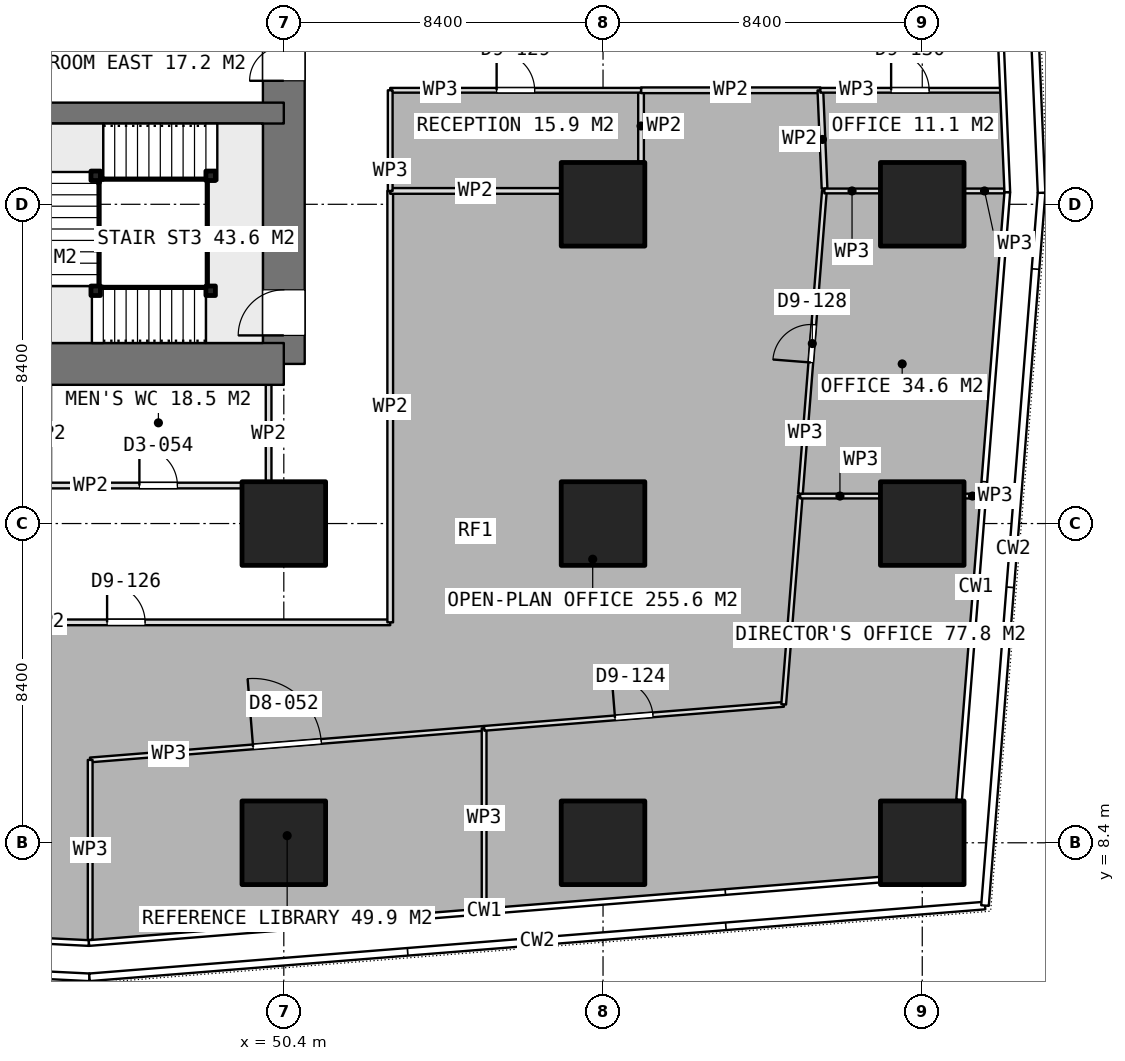
"""IFC4 building model, lengths in metres.
Left out: names, types, materials, properties, quantities, classifications, styles, units other than length and angle.
Written with IfcOpenShell. Run it as: python <this file> out.ifc"""

import sys

from ifc_helpers import new_model, si_unit, direction, frame, frame_2d, origin, origin_2d, place, context, subcontext, project, spatial, rectangle, extrude, element, fill, save


model = new_model("IFC4")
c1 = context("Model", 3, precision=1e-05, world=origin(), true_north=direction((0.0, 1.0)))
c2 = subcontext(c1, "Body", "Model", "MODEL_VIEW")
j1 = project(units=[si_unit("LENGTHUNIT", "METRE"), si_unit("PLANEANGLEUNIT", "RADIAN")], contexts=[c1])
p1 = place(None, origin())
s1 = spatial("IfcSite", under=j1, at=p1, CompositionType="ELEMENT")
p2 = place(p1, origin())
s2 = spatial("IfcBuilding", under=s1, at=p2, CompositionType="ELEMENT")
p3 = place(p2, frame((0.0, 0.0, 47.9)))
s3 = spatial("IfcBuildingStorey", under=s2, at=p3, CompositionType="ELEMENT", Elevation=47.9)
p4 = place(p3, frame((40.0, 21.0, 0.0), z_axis=(0.0, 0.0, 1.0), x_axis=(1.0, 0.0, 0.0)))
e1 = element("IfcWall", 1, at=p4, inside=s3, PredefinedType="SHEAR", context=c2, shape_type="SweptSolid", body=[
    extrude(rectangle(XDim=10.4, YDim=1.1, at=frame_2d((5.2, 0.0))), origin(), (0.0, 0.0, 1.0), 3.75),
])
p5 = place(p3, frame((50.4, 21.0, 0.0), z_axis=(0.0, 0.0, 1.0), x_axis=(0.0, 1.0, 0.0)))
e2 = element("IfcWall", 2, at=p5, inside=s3, PredefinedType="SHEAR", context=c2, shape_type="SweptSolid", body=[
    extrude(rectangle(XDim=25.2, YDim=1.1, at=frame_2d((12.6, 0.0))), origin(), (0.0, 0.0, 1.0), 3.75),
])
p6 = place(p5, frame((16.2, 0.0, 0.0)))
e3 = element("IfcOpeningElement", 3, at=p6, cuts=e2, PredefinedType="OPENING", context=c2, shape_type="SweptSolid", body=[
    extrude(rectangle(XDim=1.2, YDim=2.1, at=frame_2d((0.6, 1.05))), frame((0.0, 0.56, 0.0), z_axis=(0.0, -1.0, 0.0), x_axis=(1.0, 0.0, 0.0)), (0.0, 0.0, 1.0), 1.12),
])
p7 = place(p5, frame((10.05, 0.0, 0.0)))
e4 = element("IfcOpeningElement", 4, at=p7, cuts=e2, PredefinedType="OPENING", context=c2, shape_type="SweptSolid", body=[
    extrude(rectangle(XDim=0.9, YDim=2.1, at=frame_2d((0.45, 1.05))), frame((0.0, 0.56, 0.0), z_axis=(0.0, -1.0, 0.0), x_axis=(1.0, 0.0, 0.0)), (0.0, 0.0, 1.0), 1.12),
])
p8 = place(p5, frame((7.45, 0.0, 0.0)))
e5 = element("IfcOpeningElement", 5, at=p8, cuts=e2, PredefinedType="OPENING", context=c2, shape_type="SweptSolid", body=[
    extrude(rectangle(XDim=0.9, YDim=2.1, at=frame_2d((0.45, 1.05))), frame((0.0, 0.56, 0.0), z_axis=(0.0, -1.0, 0.0), x_axis=(1.0, 0.0, 0.0)), (0.0, 0.0, 1.0), 1.12),
])
p9 = place(p5, frame((0.75, 0.0, 0.0)))
e6 = element("IfcOpeningElement", 6, at=p9, cuts=e2, PredefinedType="OPENING", context=c2, shape_type="SweptSolid", body=[
    extrude(rectangle(XDim=1.2, YDim=2.1, at=frame_2d((0.6, 1.05))), frame((0.0, 0.56, 0.0), z_axis=(0.0, -1.0, 0.0), x_axis=(1.0, 0.0, 0.0)), (0.0, 0.0, 1.0), 1.12),
])
p10 = place(p3, frame((43.8, 27.6, 0.0), z_axis=(0.0, 0.0, 1.0), x_axis=(1.0, 0.0, 0.0)))
e7 = element("IfcWall", 7, at=p10, inside=s3, PredefinedType="SHEAR", context=c2, shape_type="SweptSolid", body=[
    extrude(rectangle(XDim=6.6, YDim=0.55, at=frame_2d((3.3, 0.0))), origin(), (0.0, 0.0, 1.0), 3.75),
])
for number, where, z_axis, x_axis in (
    (8, (50.4, 8.4, 0.0), (0.0, 0.0, 1.0), (1.0, 0.0, 0.0)),
    (9, (50.4, 16.8, 0.0), (0.0, 0.0, 1.0), (1.0, 0.0, 0.0)),
    (10, (58.8, 8.4, 0.0), (0.0, 0.0, 1.0), (1.0, 0.0, 0.0)),
    (11, (58.8, 16.8, 0.0), (0.0, 0.0, 1.0), (1.0, 0.0, 0.0)),
    (12, (58.8, 25.2, 0.0), (0.0, 0.0, 1.0), (1.0, 0.0, 0.0)),
    (13, (67.2, 8.4, 0.0), (0.0, 0.0, 1.0), (1.0, 0.0, 0.0)),
    (14, (67.2, 16.8, 0.0), (0.0, 0.0, 1.0), (1.0, 0.0, 0.0)),
    (15, (67.2, 25.2, 0.0), (0.0, 0.0, 1.0), (1.0, 0.0, 0.0)),
):
    element("IfcColumn", number, at=place(p3, frame(where, z_axis=z_axis, x_axis=x_axis)), inside=s3, PredefinedType="COLUMN", context=c2, shape_type="SweptSolid", body=[
        extrude(rectangle(XDim=2.2, YDim=2.2, at=origin_2d()), origin(), (0.0, 0.0, 1.0), 3.75),
    ])
p11 = place(p3, frame((44.125, 17.8, 0.0), z_axis=(0.0, 0.0, 1.0), x_axis=(1.0, 0.0, 0.0)))
e16 = element("IfcWall", 16, at=p11, inside=s3, PredefinedType="PARTITIONING", context=c2, shape_type="SweptSolid", body=[
    extrude(rectangle(XDim=5.95, YDim=0.15, at=frame_2d((2.975, 0.0))), origin(), (0.0, 0.0, 1.0), 3.5),
])
p12 = place(p11, frame((2.475, 0.0, 0.0)))
e17 = element("IfcOpeningElement", 17, at=p12, cuts=e16, PredefinedType="OPENING", context=c2, shape_type="SweptSolid", body=[
    extrude(rectangle(XDim=1.0, YDim=2.1, at=frame_2d((0.5, 1.05))), frame((0.0, 0.085, 0.0), z_axis=(0.0, -1.0, 0.0), x_axis=(1.0, 0.0, 0.0)), (0.0, 0.0, 1.0), 0.17),
])
p13 = place(p3, frame((50.0, 17.875, 0.0), z_axis=(0.0, 0.0, 1.0), x_axis=(0.0, 1.0, 0.0)))
e18 = element("IfcWall", 18, at=p13, inside=s3, PredefinedType="PARTITIONING", context=c2, shape_type="SweptSolid", body=[
    extrude(rectangle(XDim=2.575, YDim=0.15, at=frame_2d((1.288, 0.0))), origin(), (0.0, 0.0, 1.0), 3.5),
])
p14 = place(p3, frame((45.305, 10.58, 0.0), z_axis=(0.0, 0.0, 1.0), x_axis=(0.996803548009, 0.079891718455, 0.0)))
e19 = element("IfcWall", 19, at=p14, inside=s3, PredefinedType="PARTITIONING", context=c2, shape_type="SweptSolid", body=[
    extrude(rectangle(XDim=10.399, YDim=0.125, at=frame_2d((5.2, 0.0))), origin(), (0.0, 0.0, 1.0), 3.5),
])
p15 = place(p14, frame((4.3, 0.0, 0.0)))
e20 = element("IfcOpeningElement", 20, at=p15, cuts=e19, PredefinedType="OPENING", context=c2, shape_type="SweptSolid", body=[
    extrude(rectangle(XDim=1.8, YDim=2.1, at=frame_2d((0.9, 1.05))), frame((0.0, 0.073, 0.0), z_axis=(0.0, -1.0, 0.0), x_axis=(1.0, 0.0, 0.0)), (0.0, 0.0, 1.0), 0.145),
])
p16 = place(p3, frame((55.671, 11.411, 0.0), z_axis=(0.0, 0.0, 1.0), x_axis=(0.0, -1.0, 0.0)))
e21 = element("IfcWall", 21, at=p16, inside=s3, PredefinedType="PARTITIONING", context=c2, shape_type="SweptSolid", body=[
    extrude(rectangle(XDim=4.736, YDim=0.125, at=frame_2d((2.368, 0.0))), origin(), (0.0, 0.0, 1.0), 3.5),
])
p17 = place(p3, frame((45.305, 5.845, 0.0), z_axis=(0.0, 0.0, 1.0), x_axis=(0.0, 1.0, 0.0)))
e22 = element("IfcWall", 22, at=p17, inside=s3, PredefinedType="PARTITIONING", context=c2, shape_type="SweptSolid", body=[
    extrude(rectangle(XDim=4.735, YDim=0.125, at=frame_2d((2.368, 0.0))), origin(), (0.0, 0.0, 1.0), 3.5),
])
p18 = place(p3, frame((55.673, 11.411, 0.0), z_axis=(0.0, 0.0, 1.0), x_axis=(0.996808893134, 0.079824999652, 0.0)))
e23 = element("IfcWall", 23, at=p18, inside=s3, PredefinedType="PARTITIONING", context=c2, shape_type="SweptSolid", body=[
    extrude(rectangle(XDim=7.906, YDim=0.125, at=frame_2d((3.953, 0.0))), origin(), (0.0, 0.0, 1.0), 3.5),
])
p19 = place(p18, frame((3.453, 0.0, 0.0)))
e24 = element("IfcOpeningElement", 24, at=p19, cuts=e23, PredefinedType="OPENING", context=c2, shape_type="SweptSolid", body=[
    extrude(rectangle(XDim=1.0, YDim=2.1, at=frame_2d((0.5, 1.05))), frame((0.0, 0.073, 0.0), z_axis=(0.0, -1.0, 0.0), x_axis=(1.0, 0.0, 0.0)), (0.0, 0.0, 1.0), 0.145),
])
p20 = place(p3, frame((63.554, 12.042, 0.0), z_axis=(0.0, 0.0, 1.0), x_axis=(0.078951000854, 0.996878497844, 0.0)))
e25 = element("IfcWall", 25, at=p20, inside=s3, PredefinedType="PARTITIONING", context=c2, shape_type="SweptSolid", body=[
    extrude(rectangle(XDim=5.498, YDim=0.125, at=frame_2d((2.749, 0.0))), origin(), (0.0, 0.0, 1.0), 3.5),
])
p21 = place(p3, frame((63.988, 17.523, 0.0), z_axis=(0.0, 0.0, 1.0), x_axis=(1.0, 0.0, 0.0)))
e26 = element("IfcWall", 26, at=p21, inside=s3, PredefinedType="PARTITIONING", context=c2, shape_type="SweptSolid", body=[
    extrude(rectangle(XDim=2.092, YDim=0.125, at=frame_2d((1.046, 0.0))), origin(), (0.0, 0.0, 1.0), 3.5),
])
p22 = place(p3, frame((68.32, 17.523, 0.0), z_axis=(0.0, 0.0, 1.0), x_axis=(1.0, 0.0, 0.0)))
e27 = element("IfcWall", 27, at=p22, inside=s3, PredefinedType="PARTITIONING", context=c2, shape_type="SweptSolid", body=[
    extrude(rectangle(XDim=0.403, YDim=0.125, at=frame_2d((0.201, 0.0))), origin(), (0.0, 0.0, 1.0), 3.5),
])
p23 = place(p3, frame((63.994, 17.585, 0.0), z_axis=(0.0, 0.0, 1.0), x_axis=(0.07897654499, 0.996876474465, 0.0)))
e28 = element("IfcWall", 28, at=p23, inside=s3, PredefinedType="PARTITIONING", context=c2, shape_type="SweptSolid", body=[
    extrude(rectangle(XDim=7.991, YDim=0.125, at=frame_2d((3.996, 0.0))), origin(), (0.0, 0.0, 1.0), 3.5),
])
p24 = place(p23, frame((3.463, 0.0, 0.0)))
e29 = element("IfcOpeningElement", 29, at=p24, cuts=e28, PredefinedType="OPENING", context=c2, shape_type="SweptSolid", body=[
    extrude(rectangle(XDim=1.0, YDim=2.1, at=frame_2d((0.5, 1.05))), frame((0.0, 0.073, 0.0), z_axis=(0.0, -1.0, 0.0), x_axis=(1.0, 0.0, 0.0)), (0.0, 0.0, 1.0), 0.145),
])
p25 = place(p3, frame((64.625, 25.551, 0.0), z_axis=(0.0, 0.0, 1.0), x_axis=(1.0, 0.0, 0.0)))
e30 = element("IfcWall", 30, at=p25, inside=s3, PredefinedType="PARTITIONING", context=c2, shape_type="SweptSolid", body=[
    extrude(rectangle(XDim=1.455, YDim=0.125, at=frame_2d((0.728, 0.0))), origin(), (0.0, 0.0, 1.0), 3.5),
])
p26 = place(p3, frame((68.32, 25.551, 0.0), z_axis=(0.0, 0.0, 1.0), x_axis=(1.0, 0.0, 0.0)))
e31 = element("IfcWall", 31, at=p26, inside=s3, PredefinedType="PARTITIONING", context=c2, shape_type="SweptSolid", body=[
    extrude(rectangle(XDim=1.037, YDim=0.125, at=frame_2d((0.519, 0.0))), origin(), (0.0, 0.0, 1.0), 3.5),
])
p27 = place(p3, frame((39.3, 14.2, 0.0), z_axis=(0.0, 0.0, 1.0), x_axis=(1.0, 0.0, 0.0)))
e32 = element("IfcWall", 32, at=p27, inside=s3, PredefinedType="PARTITIONING", context=c2, shape_type="SweptSolid", body=[
    extrude(rectangle(XDim=13.9, YDim=0.15, at=frame_2d((6.95, 0.0))), origin(), (0.0, 0.0, 1.0), 3.5),
])
p28 = place(p27, frame((6.45, 0.0, 0.0)))
e33 = element("IfcOpeningElement", 33, at=p28, cuts=e32, PredefinedType="OPENING", context=c2, shape_type="SweptSolid", body=[
    extrude(rectangle(XDim=1.0, YDim=2.1, at=frame_2d((0.5, 1.05))), frame((0.0, 0.085, 0.0), z_axis=(0.0, -1.0, 0.0), x_axis=(1.0, 0.0, 0.0)), (0.0, 0.0, 1.0), 0.17),
])
p29 = place(p3, frame((53.2, 14.2, 0.0), z_axis=(0.0, 0.0, 1.0), x_axis=(0.0, 1.0, 0.0)))
e34 = element("IfcWall", 34, at=p29, inside=s3, PredefinedType="PARTITIONING", context=c2, shape_type="SweptSolid", body=[
    extrude(rectangle(XDim=11.352, YDim=0.15, at=frame_2d((5.676, 0.0))), origin(), (0.0, 0.0, 1.0), 3.5),
])
p30 = place(p3, frame((53.2, 25.552, 0.0), z_axis=(0.0, 0.0, 1.0), x_axis=(1.0, 0.0, 0.0)))
e35 = element("IfcWall", 35, at=p30, inside=s3, PredefinedType="PARTITIONING", context=c2, shape_type="SweptSolid", body=[
    extrude(rectangle(XDim=4.48, YDim=0.15, at=frame_2d((2.24, 0.0))), origin(), (0.0, 0.0, 1.0), 3.5),
])
p31 = place(p3, frame((59.8, 26.32, 0.0), z_axis=(0.0, 0.0, 1.0), x_axis=(0.0, 1.0, 0.0)))
e36 = element("IfcWall", 36, at=p31, inside=s3, PredefinedType="PARTITIONING", context=c2, shape_type="SweptSolid", body=[
    extrude(rectangle(XDim=1.88, YDim=0.15, at=frame_2d((0.94, 0.0))), origin(), (0.0, 0.0, 1.0), 3.5),
])
p32 = place(p3, frame((59.8, 28.2, 0.0), z_axis=(0.0, 0.0, 1.0), x_axis=(1.0, 0.0, 0.0)))
e37 = element("IfcWall", 37, at=p32, inside=s3, PredefinedType="PARTITIONING", context=c2, shape_type="SweptSolid", body=[
    extrude(rectangle(XDim=4.719, YDim=0.15, at=frame_2d((2.359, 0.0))), origin(), (0.0, 0.0, 1.0), 3.5),
])
p33 = place(p3, frame((64.519, 28.2, 0.0), z_axis=(0.0, 0.0, 1.0), x_axis=(0.042430609407, -0.999099416167, 0.0)))
e38 = element("IfcWall", 38, at=p33, inside=s3, PredefinedType="PARTITIONING", context=c2, shape_type="SweptSolid", body=[
    extrude(rectangle(XDim=2.589, YDim=0.15, at=frame_2d((1.295, 0.0))), origin(), (0.0, 0.0, 1.0), 3.5),
])
p34 = place(p3, frame((64.519, 28.2, 0.0), z_axis=(0.0, 0.0, 1.0), x_axis=(1.0, 0.0, 0.0)))
e39 = element("IfcWall", 39, at=p34, inside=s3, PredefinedType="PARTITIONING", context=c2, shape_type="SweptSolid", body=[
    extrude(rectangle(XDim=4.755, YDim=0.125, at=frame_2d((2.377, 0.0))), origin(), (0.0, 0.0, 1.0), 3.5),
])
p35 = place(p34, frame((1.862, 0.0, 0.0)))
e40 = element("IfcOpeningElement", 40, at=p35, cuts=e39, PredefinedType="OPENING", context=c2, shape_type="SweptSolid", body=[
    extrude(rectangle(XDim=1.0, YDim=2.1, at=frame_2d((0.5, 1.05))), frame((0.0, 0.073, 0.0), z_axis=(0.0, -1.0, 0.0), x_axis=(1.0, 0.0, 0.0)), (0.0, 0.0, 1.0), 0.145),
])
p36 = place(p3, frame((53.2, 28.2, 0.0), z_axis=(0.0, 0.0, 1.0), x_axis=(1.0, 0.0, 0.0)))
e41 = element("IfcWall", 41, at=p36, inside=s3, PredefinedType="PARTITIONING", context=c2, shape_type="SweptSolid", body=[
    extrude(rectangle(XDim=6.6, YDim=0.125, at=frame_2d((3.3, 0.0))), origin(), (0.0, 0.0, 1.0), 3.5),
])
p37 = place(p36, frame((2.8, 0.0, 0.0)))
e42 = element("IfcOpeningElement", 42, at=p37, cuts=e41, PredefinedType="OPENING", context=c2, shape_type="SweptSolid", body=[
    extrude(rectangle(XDim=1.0, YDim=2.1, at=frame_2d((0.5, 1.05))), frame((0.0, 0.073, 0.0), z_axis=(0.0, -1.0, 0.0), x_axis=(1.0, 0.0, 0.0)), (0.0, 0.0, 1.0), 0.145),
])
p38 = place(p3, frame((53.2, 25.552, 0.0), z_axis=(0.0, 0.0, 1.0), x_axis=(0.0, 1.0, 0.0)))
e43 = element("IfcWall", 43, at=p38, inside=s3, PredefinedType="PARTITIONING", context=c2, shape_type="SweptSolid", body=[
    extrude(rectangle(XDim=2.648, YDim=0.125, at=frame_2d((1.324, 0.0))), origin(), (0.0, 0.0, 1.0), 3.5),
])
for number, where, z_axis, x_axis in (
    (44, (48.475, 22.925, 0.0), (0.0, 0.0, 1.0), (1.0, 0.0, 0.0)),
    (45, (45.45, 22.925, 0.0), (0.0, 0.0, 1.0), (1.0, 0.0, 0.0)),
    (46, (45.45, 25.95, 0.0), (0.0, 0.0, 1.0), (1.0, 0.0, 0.0)),
    (47, (48.475, 25.95, 0.0), (0.0, 0.0, 1.0), (1.0, 0.0, 0.0)),
):
    element("IfcColumn", number, at=place(p3, frame(where, z_axis=z_axis, x_axis=x_axis)), inside=s3, PredefinedType="COLUMN", context=c2, shape_type="SweptSolid", body=[
        extrude(rectangle(XDim=0.25, YDim=0.25, at=origin_2d()), origin(), (0.0, 0.0, 1.0), 3.75),
    ])
p39 = place(p8, origin())
e48 = element("IfcDoor", 48, at=p39, inside=s3, OperationType="SINGLE_SWING_LEFT", PredefinedType="DOOR", context=c2, shape_type="SweptSolid", body=[
    extrude(rectangle(XDim=0.9, YDim=2.1, at=frame_2d((0.45, 1.05))), frame((0.0, 0.025, 0.0), z_axis=(0.0, -1.0, 0.0), x_axis=(1.0, 0.0, 0.0)), (0.0, 0.0, 1.0), 0.05),
])
fill(e5, e48)
p40 = place(p12, origin())
e49 = element("IfcDoor", 49, at=p40, inside=s3, OperationType="SINGLE_SWING_LEFT", PredefinedType="DOOR", context=c2, shape_type="SweptSolid", body=[
    extrude(rectangle(XDim=1.0, YDim=2.1, at=frame_2d((0.5, 1.05))), frame((0.0, 0.025, 0.0), z_axis=(0.0, -1.0, 0.0), x_axis=(1.0, 0.0, 0.0)), (0.0, 0.0, 1.0), 0.05),
])
fill(e17, e49)
p41 = place(p15, origin())
e50 = element("IfcDoor", 50, at=p41, inside=s3, OperationType="DOUBLE_DOOR_SINGLE_SWING", PredefinedType="DOOR", context=c2, shape_type="SweptSolid", body=[
    extrude(rectangle(XDim=1.8, YDim=2.1, at=frame_2d((0.9, 1.05))), frame((0.0, 0.025, 0.0), z_axis=(0.0, -1.0, 0.0), x_axis=(1.0, 0.0, 0.0)), (0.0, 0.0, 1.0), 0.05),
])
fill(e20, e50)
p42 = place(p19, origin())
e51 = element("IfcDoor", 51, at=p42, inside=s3, OperationType="SINGLE_SWING_LEFT", PredefinedType="DOOR", context=c2, shape_type="SweptSolid", body=[
    extrude(rectangle(XDim=1.0, YDim=2.1, at=frame_2d((0.5, 1.05))), frame((0.0, 0.025, 0.0), z_axis=(0.0, -1.0, 0.0), x_axis=(1.0, 0.0, 0.0)), (0.0, 0.0, 1.0), 0.05),
])
fill(e24, e51)
p43 = place(p24, origin())
e52 = element("IfcDoor", 52, at=p43, inside=s3, OperationType="SINGLE_SWING_LEFT", PredefinedType="DOOR", context=c2, shape_type="SweptSolid", body=[
    extrude(rectangle(XDim=1.0, YDim=2.1, at=frame_2d((0.5, 1.05))), frame((0.0, 0.025, 0.0), z_axis=(0.0, -1.0, 0.0), x_axis=(1.0, 0.0, 0.0)), (0.0, 0.0, 1.0), 0.05),
])
fill(e29, e52)
p44 = place(p28, origin())
e53 = element("IfcDoor", 53, at=p44, inside=s3, OperationType="SINGLE_SWING_LEFT", PredefinedType="DOOR", context=c2, shape_type="SweptSolid", body=[
    extrude(rectangle(XDim=1.0, YDim=2.1, at=frame_2d((0.5, 1.05))), frame((0.0, 0.025, 0.0), z_axis=(0.0, -1.0, 0.0), x_axis=(1.0, 0.0, 0.0)), (0.0, 0.0, 1.0), 0.05),
])
fill(e33, e53)
p45 = place(p35, origin())
e54 = element("IfcDoor", 54, at=p45, inside=s3, OperationType="SINGLE_SWING_LEFT", PredefinedType="DOOR", context=c2, shape_type="SweptSolid", body=[
    extrude(rectangle(XDim=1.0, YDim=2.1, at=frame_2d((0.5, 1.05))), frame((0.0, 0.025, 0.0), z_axis=(0.0, -1.0, 0.0), x_axis=(1.0, 0.0, 0.0)), (0.0, 0.0, 1.0), 0.05),
])
fill(e40, e54)
p46 = place(p37, origin())
e55 = element("IfcDoor", 55, at=p46, inside=s3, OperationType="SINGLE_SWING_LEFT", PredefinedType="DOOR", context=c2, shape_type="SweptSolid", body=[
    extrude(rectangle(XDim=1.0, YDim=2.1, at=frame_2d((0.5, 1.05))), frame((0.0, 0.025, 0.0), z_axis=(0.0, -1.0, 0.0), x_axis=(1.0, 0.0, 0.0)), (0.0, 0.0, 1.0), 0.05),
])
fill(e42, e55)
p47 = place(p9, origin())
e56 = element("IfcDoor", 56, at=p47, inside=s3, OperationType="SINGLE_SWING_RIGHT", PredefinedType="DOOR", context=c2, shape_type="SweptSolid", body=[
    extrude(rectangle(XDim=1.2, YDim=2.1, at=frame_2d((0.6, 1.05))), frame((0.0, 0.025, 0.0), z_axis=(0.0, -1.0, 0.0), x_axis=(1.0, 0.0, 0.0)), (0.0, 0.0, 1.0), 0.05),
])
fill(e6, e56)
save(model, sys.argv[1])
